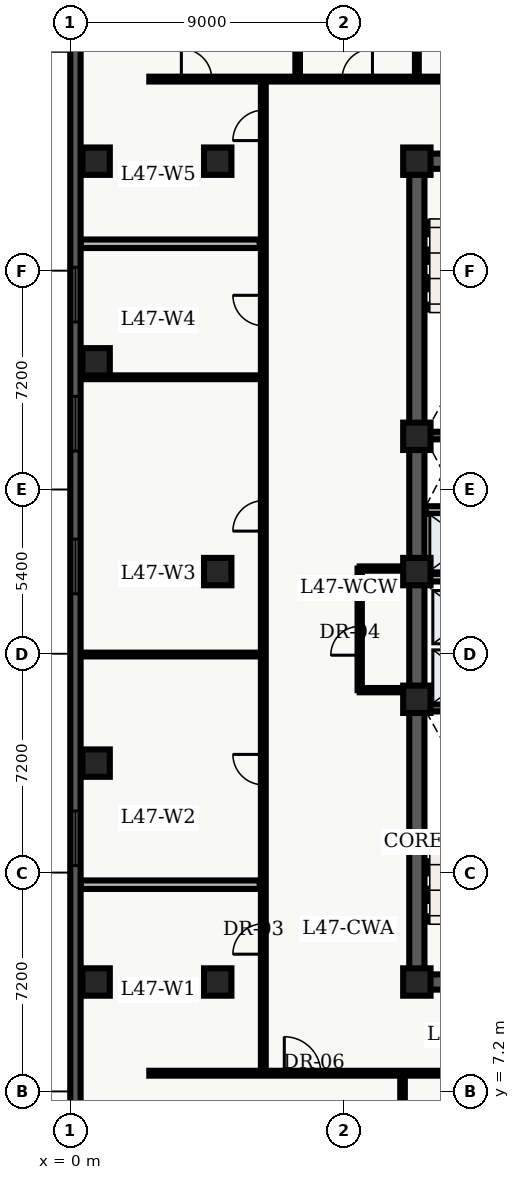
"""IFC4 building model, lengths in metres.
Left out: names, types, materials, properties, quantities, classifications, styles, units other than length and angle.
Written with IfcOpenShell. Run it as: python <this file> out.ifc"""

import sys

from ifc_helpers import new_model, entity, si_unit, converted_unit, direction, frame, origin_with_axes, origin_2d_with_axis, place, context, subcontext, project, spatial, polyline, rectangle, outline, extrude, element, fill, save


model = new_model("IFC4")
c1 = context("Model", 3, precision=1e-05, world=origin_with_axes(), true_north=direction((0.0, 1.0)))
c2 = subcontext(c1, "Body", "Model", "MODEL_VIEW")
j1 = project(units=[si_unit("LENGTHUNIT", "METRE"), converted_unit("PLANEANGLEUNIT", "DEGREE", entity("IfcPlaneAngleMeasure", 0.017), si_unit("PLANEANGLEUNIT", "RADIAN"), dimensions=[0, 0, 0, 0, 0, 0, 0])], contexts=[c1])
p1 = place(None, origin_with_axes())
s1 = spatial("IfcSite", under=j1, at=p1, CompositionType="ELEMENT")
p2 = place(p1, origin_with_axes())
s2 = spatial("IfcBuilding", under=s1, at=p2, CompositionType="ELEMENT")
p3 = place(p2, frame((0.0, 0.0, 192.6), z_axis=(0.0, 0.0, 1.0), x_axis=(1.0, 0.0, 0.0)))
s3 = spatial("IfcBuildingStorey", under=s2, at=p3, CompositionType="ELEMENT", Elevation=192.6)
p4 = place(p3, frame((11.4, 10.8, 0.0), z_axis=(0.0, 0.0, 1.0), x_axis=(0.0, 1.0, 0.0)))
e1 = element("IfcWall", 1, at=p4, inside=s3, PredefinedType="SHEAR", context=c2, shape_type="SweptSolid", body=[
    extrude(outline(polyline([(0.0, -0.25), (27.0, -0.25), (27.0, 0.25), (0.0, 0.25), (0.0, -0.25)])), origin_with_axes(), (0.0, 0.0, 1.0), 3.66),
])
p5 = place(p3, frame((11.4, 10.8, 0.0), z_axis=(0.0, 0.0, 1.0), x_axis=(1.0, 0.0, 0.0)))
e2 = element("IfcWall", 2, at=p5, inside=s3, PredefinedType="SHEAR", context=c2, shape_type="SweptSolid", body=[
    extrude(outline(polyline([(0.0, -0.25), (7.2, -0.25), (7.2, 0.25), (0.0, 0.25), (0.0, -0.25)])), origin_with_axes(), (0.0, 0.0, 1.0), 3.66),
])
p6 = place(p5, frame((2.625, 0.0, 0.0), z_axis=(0.0, 0.0, 1.0), x_axis=(1.0, 0.0, 0.0)))
e3 = element("IfcOpeningElement", 3, at=p6, cuts=e2, PredefinedType="OPENING", context=c2, shape_type="SweptSolid", body=[
    extrude(rectangle(XDim=1.05, YDim=0.52, at=origin_2d_with_axis()), origin_with_axes(), (0.0, 0.0, 1.0), 2.15),
])
p7 = place(p3, frame((11.4, 37.8, 0.0), z_axis=(0.0, 0.0, 1.0), x_axis=(1.0, 0.0, 0.0)))
e4 = element("IfcWall", 4, at=p7, inside=s3, PredefinedType="SHEAR", context=c2, shape_type="SweptSolid", body=[
    extrude(outline(polyline([(0.0, -0.25), (7.2, -0.25), (7.2, 0.25), (0.0, 0.25), (0.0, -0.25)])), origin_with_axes(), (0.0, 0.0, 1.0), 3.66),
])
p8 = place(p7, frame((2.625, 0.0, 0.0), z_axis=(0.0, 0.0, 1.0), x_axis=(1.0, 0.0, 0.0)))
e5 = element("IfcOpeningElement", 5, at=p8, cuts=e4, PredefinedType="OPENING", context=c2, shape_type="SweptSolid", body=[
    extrude(rectangle(XDim=1.05, YDim=0.52, at=origin_2d_with_axis()), origin_with_axes(), (0.0, 0.0, 1.0), 2.15),
])
for number, where, z_axis, x_axis in (
    (6, (11.65, 19.825, 0.0), (0.0, 0.0, 1.0), (1.0, 0.0, 0.0)),
    (7, (11.65, 28.775, 0.0), (0.0, 0.0, 1.0), (1.0, 0.0, 0.0)),
):
    element("IfcWall", number, at=place(p3, frame(where, z_axis=z_axis, x_axis=x_axis)), inside=s3, PredefinedType="SHEAR", context=c2, shape_type="SweptSolid", body=[
        extrude(outline(polyline([(0.0, -0.125), (6.7, -0.125), (6.7, 0.125), (0.0, 0.125), (0.0, -0.125)])), origin_with_axes(), (0.0, 0.0, 1.0), 3.66),
    ])
p9 = place(p3, frame((11.7, 24.1, 0.0), z_axis=(0.0, 0.0, 1.0), x_axis=(1.0, 0.0, 0.0)))
e8 = element("IfcWall", 8, at=p9, inside=s3, PredefinedType="SOLIDWALL", context=c2, shape_type="SweptSolid", body=[
    extrude(outline(polyline([(0.0, -0.125), (6.6, -0.125), (6.6, 0.125), (0.0, 0.125), (0.0, -0.125)])), origin_with_axes(), (0.0, 0.0, 1.0), 2.7),
])
p10 = place(p9, frame((3.75, 0.0, 0.0), z_axis=(0.0, 0.0, 1.0), x_axis=(1.0, 0.0, 0.0)))
e9 = element("IfcOpeningElement", 9, at=p10, cuts=e8, PredefinedType="OPENING", context=c2, shape_type="SweptSolid", body=[
    extrude(rectangle(XDim=0.9, YDim=0.27, at=origin_2d_with_axis()), origin_with_axes(), (0.0, 0.0, 1.0), 2.15),
])
p11 = place(p3, frame((11.7, 26.325, 0.0), z_axis=(0.0, 0.0, 1.0), x_axis=(1.0, 0.0, 0.0)))
e10 = element("IfcWall", 10, at=p11, inside=s3, PredefinedType="SOLIDWALL", context=c2, shape_type="SweptSolid", body=[
    extrude(outline(polyline([(0.0, -0.125), (6.6, -0.125), (6.6, 0.125), (0.0, 0.125), (0.0, -0.125)])), origin_with_axes(), (0.0, 0.0, 1.0), 2.7),
])
p12 = place(p11, frame((3.5, 0.0, 0.0), z_axis=(0.0, 0.0, 1.0), x_axis=(1.0, 0.0, 0.0)))
e11 = element("IfcOpeningElement", 11, at=p12, cuts=e10, PredefinedType="OPENING", context=c2, shape_type="SweptSolid", body=[
    extrude(rectangle(XDim=0.9, YDim=0.27, at=origin_2d_with_axis()), origin_with_axes(), (0.0, 0.0, 1.0), 2.15),
])
for number, where, z_axis, x_axis in (
    (12, (11.4, 10.8, 0.0), (0.0, 0.0, 1.0), (1.0, 0.0, 0.0)),
    (13, (11.4, 20.1, 0.0), (0.0, 0.0, 1.0), (1.0, 0.0, 0.0)),
    (14, (11.4, 24.3, 0.0), (0.0, 0.0, 1.0), (1.0, 0.0, 0.0)),
    (15, (11.4, 28.75, 0.0), (0.0, 0.0, 1.0), (1.0, 0.0, 0.0)),
    (16, (11.4, 37.8, 0.0), (0.0, 0.0, 1.0), (1.0, 0.0, 0.0)),
    (17, (4.85, 10.8, 0.0), (0.0, 0.0, 1.0), (1.0, 0.0, 0.0)),
    (18, (4.85, 24.3, 0.0), (0.0, 0.0, 1.0), (1.0, 0.0, 0.0)),
    (19, (4.85, 37.8, 0.0), (0.0, 0.0, 1.0), (1.0, 0.0, 0.0)),
    (20, (0.85, 10.8, 0.0), (0.0, 0.0, 1.0), (1.0, 0.0, 0.0)),
    (21, (0.85, 18.0, 0.0), (0.0, 0.0, 1.0), (1.0, 0.0, 0.0)),
    (22, (0.85, 31.2, 0.0), (0.0, 0.0, 1.0), (1.0, 0.0, 0.0)),
    (23, (0.85, 37.8, 0.0), (0.0, 0.0, 1.0), (1.0, 0.0, 0.0)),
):
    element("IfcColumn", number, at=place(p3, frame(where, z_axis=z_axis, x_axis=x_axis)), inside=s3, PredefinedType="COLUMN", context=c2, shape_type="SweptSolid", body=[
        extrude(rectangle(XDim=0.9, YDim=0.9, at=origin_2d_with_axis()), origin_with_axes(), (0.0, 0.0, 1.0), 3.9),
    ])
p13 = place(p3, frame((9.52, 20.4, 0.0), z_axis=(0.0, 0.0, 1.0), x_axis=(0.0, 1.0, 0.0)))
e24 = element("IfcWall", 24, at=p13, inside=s3, PredefinedType="PARTITIONING", context=c2, shape_type="SweptSolid", body=[
    extrude(outline(polyline([(0.0, -0.07), (4.0, -0.07), (4.0, 0.07), (0.0, 0.07), (0.0, -0.07)])), origin_with_axes(), (0.0, 0.0, 1.0), 2.7),
])
p14 = place(p13, frame((1.625, 0.0, 0.0), z_axis=(0.0, 0.0, 1.0), x_axis=(1.0, 0.0, 0.0)))
e25 = element("IfcOpeningElement", 25, at=p14, cuts=e24, PredefinedType="OPENING", context=c2, shape_type="SweptSolid", body=[
    extrude(rectangle(XDim=0.95, YDim=0.16, at=origin_2d_with_axis()), origin_with_axes(), (0.0, 0.0, 1.0), 2.15),
])
for number, where, z_axis, x_axis in (
    (26, (9.52, 20.4, 0.0), (0.0, 0.0, 1.0), (1.0, 0.0, 0.0)),
    (27, (9.52, 24.4, 0.0), (0.0, 0.0, 1.0), (1.0, 0.0, 0.0)),
):
    element("IfcWall", number, at=place(p3, frame(where, z_axis=z_axis, x_axis=x_axis)), inside=s3, PredefinedType="PARTITIONING", context=c2, shape_type="SweptSolid", body=[
        extrude(outline(polyline([(0.0, -0.07), (1.58, -0.07), (1.58, 0.07), (0.0, 0.07), (0.0, -0.07)])), origin_with_axes(), (0.0, 0.0, 1.0), 2.7),
    ])
p15 = place(p3, frame((2.6, 7.8, 0.0), z_axis=(0.0, 0.0, 1.0), x_axis=(1.0, 0.0, 0.0)))
e28 = element("IfcWall", 28, at=p15, inside=s3, PredefinedType="PARTITIONING", context=c2, shape_type="SweptSolid", body=[
    extrude(outline(polyline([(0.0, -0.08), (18.55, -0.08), (18.55, 0.08), (0.0, 0.08), (0.0, -0.08)])), origin_with_axes(), (0.0, 0.0, 1.0), 2.7),
])
p16 = place(p15, frame((5.04, 0.0, 0.0), z_axis=(0.0, 0.0, 1.0), x_axis=(1.0, 0.0, 0.0)))
e29 = element("IfcOpeningElement", 29, at=p16, cuts=e28, PredefinedType="OPENING", context=c2, shape_type="SweptSolid", body=[
    extrude(rectangle(XDim=1.2, YDim=0.18, at=origin_2d_with_axis()), origin_with_axes(), (0.0, 0.0, 1.0), 2.2),
])
p17 = place(p15, frame((13.415, 0.0, 0.0), z_axis=(0.0, 0.0, 1.0), x_axis=(1.0, 0.0, 0.0)))
e30 = element("IfcOpeningElement", 30, at=p17, cuts=e28, PredefinedType="OPENING", context=c2, shape_type="SweptSolid", body=[
    extrude(rectangle(XDim=1.0, YDim=0.18, at=origin_2d_with_axis()), origin_with_axes(), (0.0, 0.0, 1.0), 2.15),
])
p18 = place(p3, frame((2.6, 40.5, 0.0), z_axis=(0.0, 0.0, 1.0), x_axis=(1.0, 0.0, 0.0)))
e31 = element("IfcWall", 31, at=p18, inside=s3, PredefinedType="PARTITIONING", context=c2, shape_type="SweptSolid", body=[
    extrude(outline(polyline([(0.0, -0.08), (24.746, -0.08), (24.746, 0.08), (0.0, 0.08), (0.0, -0.08)])), origin_with_axes(), (0.0, 0.0, 1.0), 2.7),
])
p19 = place(p18, frame((1.554, 0.0, 0.0), z_axis=(0.0, 0.0, 1.0), x_axis=(1.0, 0.0, 0.0)))
e32 = element("IfcOpeningElement", 32, at=p19, cuts=e31, PredefinedType="OPENING", context=c2, shape_type="SweptSolid", body=[
    extrude(rectangle(XDim=1.0, YDim=0.18, at=origin_2d_with_axis()), origin_with_axes(), (0.0, 0.0, 1.0), 2.15),
])
p20 = place(p18, frame((6.84, 0.0, 0.0), z_axis=(0.0, 0.0, 1.0), x_axis=(1.0, 0.0, 0.0)))
e33 = element("IfcOpeningElement", 33, at=p20, cuts=e31, PredefinedType="OPENING", context=c2, shape_type="SweptSolid", body=[
    extrude(rectangle(XDim=1.0, YDim=0.18, at=origin_2d_with_axis()), origin_with_axes(), (0.0, 0.0, 1.0), 2.15),
])
p21 = place(p18, frame((11.276, 0.0, 0.0), z_axis=(0.0, 0.0, 1.0), x_axis=(1.0, 0.0, 0.0)))
e34 = element("IfcOpeningElement", 34, at=p21, cuts=e31, PredefinedType="OPENING", context=c2, shape_type="SweptSolid", body=[
    extrude(rectangle(XDim=1.0, YDim=0.18, at=origin_2d_with_axis()), origin_with_axes(), (0.0, 0.0, 1.0), 2.15),
])
p22 = place(p18, frame((15.636, 0.0, 0.0), z_axis=(0.0, 0.0, 1.0), x_axis=(1.0, 0.0, 0.0)))
e35 = element("IfcOpeningElement", 35, at=p22, cuts=e31, PredefinedType="OPENING", context=c2, shape_type="SweptSolid", body=[
    extrude(rectangle(XDim=1.0, YDim=0.18, at=origin_2d_with_axis()), origin_with_axes(), (0.0, 0.0, 1.0), 2.15),
])
p23 = place(p3, frame((6.35, 7.8, 0.0), z_axis=(0.0, 0.0, 1.0), x_axis=(0.0, 1.0, 0.0)))
e36 = element("IfcWall", 36, at=p23, inside=s3, PredefinedType="PARTITIONING", context=c2, shape_type="SweptSolid", body=[
    extrude(outline(polyline([(0.0, -0.08), (32.7, -0.08), (32.7, 0.08), (0.0, 0.08), (0.0, -0.08)])), origin_with_axes(), (0.0, 0.0, 1.0), 2.7),
])
p24 = place(p23, frame((4.415, 0.0, 0.0), z_axis=(0.0, 0.0, 1.0), x_axis=(1.0, 0.0, 0.0)))
e37 = element("IfcOpeningElement", 37, at=p24, cuts=e36, PredefinedType="OPENING", context=c2, shape_type="SweptSolid", body=[
    extrude(rectangle(XDim=1.0, YDim=0.18, at=origin_2d_with_axis()), origin_with_axes(), (0.0, 0.0, 1.0), 2.15),
])
p25 = place(p23, frame((9.986, 0.0, 0.0), z_axis=(0.0, 0.0, 1.0), x_axis=(1.0, 0.0, 0.0)))
e38 = element("IfcOpeningElement", 38, at=p25, cuts=e36, PredefinedType="OPENING", context=c2, shape_type="SweptSolid", body=[
    extrude(rectangle(XDim=1.0, YDim=0.18, at=origin_2d_with_axis()), origin_with_axes(), (0.0, 0.0, 1.0), 2.15),
])
p26 = place(p23, frame((18.332, 0.0, 0.0), z_axis=(0.0, 0.0, 1.0), x_axis=(1.0, 0.0, 0.0)))
e39 = element("IfcOpeningElement", 39, at=p26, cuts=e36, PredefinedType="OPENING", context=c2, shape_type="SweptSolid", body=[
    extrude(rectangle(XDim=1.0, YDim=0.18, at=origin_2d_with_axis()), origin_with_axes(), (0.0, 0.0, 1.0), 2.15),
])
p27 = place(p23, frame((25.088, 0.0, 0.0), z_axis=(0.0, 0.0, 1.0), x_axis=(1.0, 0.0, 0.0)))
e40 = element("IfcOpeningElement", 40, at=p27, cuts=e36, PredefinedType="OPENING", context=c2, shape_type="SweptSolid", body=[
    extrude(rectangle(XDim=1.0, YDim=0.18, at=origin_2d_with_axis()), origin_with_axes(), (0.0, 0.0, 1.0), 2.15),
])
p28 = place(p23, frame((31.177, 0.0, 0.0), z_axis=(0.0, 0.0, 1.0), x_axis=(1.0, 0.0, 0.0)))
e41 = element("IfcOpeningElement", 41, at=p28, cuts=e36, PredefinedType="OPENING", context=c2, shape_type="SweptSolid", body=[
    extrude(rectangle(XDim=1.0, YDim=0.18, at=origin_2d_with_axis()), origin_with_axes(), (0.0, 0.0, 1.0), 2.15),
])
p29 = place(p3, frame((0.335, 14.001, 0.0), z_axis=(0.0, 0.0, 1.0), x_axis=(1.0, 0.0, 0.0)))
e42 = element("IfcWall", 42, at=p29, inside=s3, PredefinedType="PARTITIONING", context=c2, shape_type="SweptSolid", body=[
    extrude(outline(polyline([(0.0, -0.14), (5.895, -0.14), (5.895, 0.14), (0.0, 0.14), (0.0, -0.14)])), origin_with_axes(), (0.0, 0.0, 1.0), 2.7),
])
for number, where, z_axis, x_axis in (
    (43, (0.335, 21.572, 0.0), (0.0, 0.0, 1.0), (1.0, 0.0, 0.0)),
    (44, (0.335, 30.692, 0.0), (0.0, 0.0, 1.0), (1.0, 0.0, 0.0)),
):
    element("IfcWall", number, at=place(p3, frame(where, z_axis=z_axis, x_axis=x_axis)), inside=s3, PredefinedType="PARTITIONING", context=c2, shape_type="SweptSolid", body=[
        extrude(outline(polyline([(0.0, -0.062), (5.895, -0.062), (5.895, 0.062), (0.0, 0.062), (0.0, -0.062)])), origin_with_axes(), (0.0, 0.0, 1.0), 2.7),
    ])
p30 = place(p3, frame((0.335, 35.084, 0.0), z_axis=(0.0, 0.0, 1.0), x_axis=(1.0, 0.0, 0.0)))
e45 = element("IfcWall", 45, at=p30, inside=s3, PredefinedType="PARTITIONING", context=c2, shape_type="SweptSolid", body=[
    extrude(outline(polyline([(0.0, -0.14), (5.895, -0.14), (5.895, 0.14), (0.0, 0.14), (0.0, -0.14)])), origin_with_axes(), (0.0, 0.0, 1.0), 2.7),
])
p31 = place(p3, frame((10.929, 0.335, 0.0), z_axis=(0.0, 0.0, 1.0), x_axis=(0.0, 1.0, 0.0)))
e46 = element("IfcWall", 46, at=p31, inside=s3, PredefinedType="PARTITIONING", context=c2, shape_type="SweptSolid", body=[
    extrude(outline(polyline([(0.0, -0.075), (7.365, -0.075), (7.365, 0.075), (0.0, 0.075), (0.0, -0.075)])), origin_with_axes(), (0.0, 0.0, 1.0), 2.7),
])
p32 = place(p3, frame((7.479, 40.6, 0.0), z_axis=(0.0, 0.0, 1.0), x_axis=(0.0, 1.0, 0.0)))
e47 = element("IfcWall", 47, at=p32, inside=s3, PredefinedType="PARTITIONING", context=c2, shape_type="SweptSolid", body=[
    extrude(outline(polyline([(0.0, -0.075), (7.665, -0.075), (7.665, 0.075), (0.0, 0.075), (0.0, -0.075)])), origin_with_axes(), (0.0, 0.0, 1.0), 2.7),
])
p33 = place(p3, frame((11.4, 40.6, 0.0), z_axis=(0.0, 0.0, 1.0), x_axis=(0.0, 1.0, 0.0)))
e48 = element("IfcWall", 48, at=p33, inside=s3, PredefinedType="PARTITIONING", context=c2, shape_type="SweptSolid", body=[
    extrude(outline(polyline([(0.0, -0.062), (7.665, -0.062), (7.665, 0.062), (0.0, 0.062), (0.0, -0.062)])), origin_with_axes(), (0.0, 0.0, 1.0), 2.7),
])
p34 = place(p3, frame((0.17, 2.74, 0.0), z_axis=(0.0, 0.0, 1.0), x_axis=(0.0, 1.0, 0.0)))
e49 = element("IfcWall", 49, at=p34, inside=s3, PredefinedType="SOLIDWALL", context=c2, shape_type="SweptSolid", body=[
    extrude(outline(polyline([(0.0, -0.17), (43.46, -0.17), (43.46, 0.17), (0.0, 0.17), (0.0, -0.17)])), origin_with_axes(), (0.0, 0.0, 1.0), 3.66),
])
p35 = place(p34, frame((2.948, 0.0, 0.45), z_axis=(0.0, 0.0, 1.0), x_axis=(1.0, 0.0, 0.0)))
e50 = element("IfcOpeningElement", 50, at=p35, cuts=e49, PredefinedType="OPENING", context=c2, shape_type="SweptSolid", body=[
    extrude(rectangle(XDim=1.8, YDim=0.36, at=origin_2d_with_axis()), origin_with_axes(), (0.0, 0.0, 1.0), 2.1),
])
p36 = place(p34, frame((12.789, 0.0, 0.45), z_axis=(0.0, 0.0, 1.0), x_axis=(1.0, 0.0, 0.0)))
e51 = element("IfcOpeningElement", 51, at=p36, cuts=e49, PredefinedType="OPENING", context=c2, shape_type="SweptSolid", body=[
    extrude(rectangle(XDim=1.8, YDim=0.36, at=origin_2d_with_axis()), origin_with_axes(), (0.0, 0.0, 1.0), 2.1),
])
p37 = place(p34, frame((21.73, 0.0, 0.45), z_axis=(0.0, 0.0, 1.0), x_axis=(1.0, 0.0, 0.0)))
e52 = element("IfcOpeningElement", 52, at=p37, cuts=e49, PredefinedType="OPENING", context=c2, shape_type="SweptSolid", body=[
    extrude(rectangle(XDim=1.8, YDim=0.36, at=origin_2d_with_axis()), origin_with_axes(), (0.0, 0.0, 1.0), 2.1),
])
p38 = place(p34, frame((26.426, 0.0, 0.45), z_axis=(0.0, 0.0, 1.0), x_axis=(1.0, 0.0, 0.0)))
e53 = element("IfcOpeningElement", 53, at=p38, cuts=e49, PredefinedType="OPENING", context=c2, shape_type="SweptSolid", body=[
    extrude(rectangle(XDim=1.8, YDim=0.36, at=origin_2d_with_axis()), origin_with_axes(), (0.0, 0.0, 1.0), 2.1),
])
p39 = place(p34, frame((30.671, 0.0, 0.45), z_axis=(0.0, 0.0, 1.0), x_axis=(1.0, 0.0, 0.0)))
e54 = element("IfcOpeningElement", 54, at=p39, cuts=e49, PredefinedType="OPENING", context=c2, shape_type="SweptSolid", body=[
    extrude(rectangle(XDim=1.8, YDim=0.36, at=origin_2d_with_axis()), origin_with_axes(), (0.0, 0.0, 1.0), 2.1),
])
p40 = place(p34, frame((40.062, 0.0, 0.45), z_axis=(0.0, 0.0, 1.0), x_axis=(1.0, 0.0, 0.0)))
e55 = element("IfcOpeningElement", 55, at=p40, cuts=e49, PredefinedType="OPENING", context=c2, shape_type="SweptSolid", body=[
    extrude(rectangle(XDim=1.8, YDim=0.36, at=origin_2d_with_axis()), origin_with_axes(), (0.0, 0.0, 1.0), 2.1),
])
p41 = place(p13, frame((1.625, 0.0, 0.0), z_axis=(0.0, 0.0, 1.0), x_axis=(1.0, 0.0, 0.0)))
e56 = element("IfcDoor", 56, at=p41, inside=s3, OperationType="SINGLE_SWING_LEFT", PredefinedType="DOOR", context=c2, shape_type="SweptSolid", body=[
    extrude(rectangle(XDim=0.95, YDim=0.084, at=origin_2d_with_axis()), origin_with_axes(), (0.0, 0.0, 1.0), 2.15),
])
fill(e25, e56)
p42 = place(p23, frame((4.415, 0.0, 0.0), z_axis=(0.0, 0.0, 1.0), x_axis=(1.0, 0.0, 0.0)))
e57 = element("IfcDoor", 57, at=p42, inside=s3, OperationType="SINGLE_SWING_LEFT", PredefinedType="DOOR", context=c2, shape_type="SweptSolid", body=[
    extrude(rectangle(XDim=1.0, YDim=0.09, at=origin_2d_with_axis()), origin_with_axes(), (0.0, 0.0, 1.0), 2.15),
])
fill(e37, e57)
p43 = place(p23, frame((9.986, 0.0, 0.0), z_axis=(0.0, 0.0, 1.0), x_axis=(1.0, 0.0, 0.0)))
e58 = element("IfcDoor", 58, at=p43, inside=s3, OperationType="SINGLE_SWING_RIGHT", PredefinedType="DOOR", context=c2, shape_type="SweptSolid", body=[
    extrude(rectangle(XDim=1.0, YDim=0.09, at=origin_2d_with_axis()), origin_with_axes(), (0.0, 0.0, 1.0), 2.15),
])
fill(e38, e58)
p44 = place(p23, frame((18.332, 0.0, 0.0), z_axis=(0.0, 0.0, 1.0), x_axis=(1.0, 0.0, 0.0)))
e59 = element("IfcDoor", 59, at=p44, inside=s3, OperationType="SINGLE_SWING_LEFT", PredefinedType="DOOR", context=c2, shape_type="SweptSolid", body=[
    extrude(rectangle(XDim=1.0, YDim=0.09, at=origin_2d_with_axis()), origin_with_axes(), (0.0, 0.0, 1.0), 2.15),
])
fill(e39, e59)
p45 = place(p23, frame((25.088, 0.0, 0.0), z_axis=(0.0, 0.0, 1.0), x_axis=(1.0, 0.0, 0.0)))
e60 = element("IfcDoor", 60, at=p45, inside=s3, OperationType="SINGLE_SWING_RIGHT", PredefinedType="DOOR", context=c2, shape_type="SweptSolid", body=[
    extrude(rectangle(XDim=1.0, YDim=0.09, at=origin_2d_with_axis()), origin_with_axes(), (0.0, 0.0, 1.0), 2.15),
])
fill(e40, e60)
p46 = place(p23, frame((31.177, 0.0, 0.0), z_axis=(0.0, 0.0, 1.0), x_axis=(1.0, 0.0, 0.0)))
e61 = element("IfcDoor", 61, at=p46, inside=s3, OperationType="SINGLE_SWING_LEFT", PredefinedType="DOOR", context=c2, shape_type="SweptSolid", body=[
    extrude(rectangle(XDim=1.0, YDim=0.09, at=origin_2d_with_axis()), origin_with_axes(), (0.0, 0.0, 1.0), 2.15),
])
fill(e41, e61)
p47 = place(p15, frame((5.04, 0.0, 0.0), z_axis=(0.0, 0.0, 1.0), x_axis=(1.0, 0.0, 0.0)))
e62 = element("IfcDoor", 62, at=p47, inside=s3, OperationType="SINGLE_SWING_LEFT", PredefinedType="DOOR", context=c2, shape_type="SweptSolid", body=[
    extrude(rectangle(XDim=1.2, YDim=0.09, at=origin_2d_with_axis()), origin_with_axes(), (0.0, 0.0, 1.0), 2.2),
])
fill(e29, e62)
p48 = place(p18, frame((1.554, 0.0, 0.0), z_axis=(0.0, 0.0, 1.0), x_axis=(1.0, 0.0, 0.0)))
e63 = element("IfcDoor", 63, at=p48, inside=s3, OperationType="SINGLE_SWING_LEFT", PredefinedType="DOOR", context=c2, shape_type="SweptSolid", body=[
    extrude(rectangle(XDim=1.0, YDim=0.09, at=origin_2d_with_axis()), origin_with_axes(), (0.0, 0.0, 1.0), 2.15),
])
fill(e32, e63)
p49 = place(p18, frame((6.84, 0.0, 0.0), z_axis=(0.0, 0.0, 1.0), x_axis=(1.0, 0.0, 0.0)))
e64 = element("IfcDoor", 64, at=p49, inside=s3, OperationType="SINGLE_SWING_RIGHT", PredefinedType="DOOR", context=c2, shape_type="SweptSolid", body=[
    extrude(rectangle(XDim=1.0, YDim=0.09, at=origin_2d_with_axis()), origin_with_axes(), (0.0, 0.0, 1.0), 2.15),
])
fill(e33, e64)
p50 = place(p34, frame((12.789, 0.0, 0.45), z_axis=(0.0, 0.0, 1.0), x_axis=(1.0, 0.0, 0.0)))
e65 = element("IfcWindow", 65, at=p50, inside=s3, PredefinedType="WINDOW", context=c2, shape_type="SweptSolid", body=[
    extrude(rectangle(XDim=1.8, YDim=0.09, at=origin_2d_with_axis()), origin_with_axes(), (0.0, 0.0, 1.0), 2.1),
])
fill(e51, e65)
p51 = place(p34, frame((21.73, 0.0, 0.45), z_axis=(0.0, 0.0, 1.0), x_axis=(1.0, 0.0, 0.0)))
e66 = element("IfcWindow", 66, at=p51, inside=s3, PredefinedType="WINDOW", context=c2, shape_type="SweptSolid", body=[
    extrude(rectangle(XDim=1.8, YDim=0.09, at=origin_2d_with_axis()), origin_with_axes(), (0.0, 0.0, 1.0), 2.1),
])
fill(e52, e66)
p52 = place(p34, frame((26.426, 0.0, 0.45), z_axis=(0.0, 0.0, 1.0), x_axis=(1.0, 0.0, 0.0)))
e67 = element("IfcWindow", 67, at=p52, inside=s3, PredefinedType="WINDOW", context=c2, shape_type="SweptSolid", body=[
    extrude(rectangle(XDim=1.8, YDim=0.09, at=origin_2d_with_axis()), origin_with_axes(), (0.0, 0.0, 1.0), 2.1),
])
fill(e53, e67)
p53 = place(p34, frame((30.671, 0.0, 0.45), z_axis=(0.0, 0.0, 1.0), x_axis=(1.0, 0.0, 0.0)))
e68 = element("IfcWindow", 68, at=p53, inside=s3, PredefinedType="WINDOW", context=c2, shape_type="SweptSolid", body=[
    extrude(rectangle(XDim=1.8, YDim=0.09, at=origin_2d_with_axis()), origin_with_axes(), (0.0, 0.0, 1.0), 2.1),
])
fill(e54, e68)
save(model, sys.argv[1])
